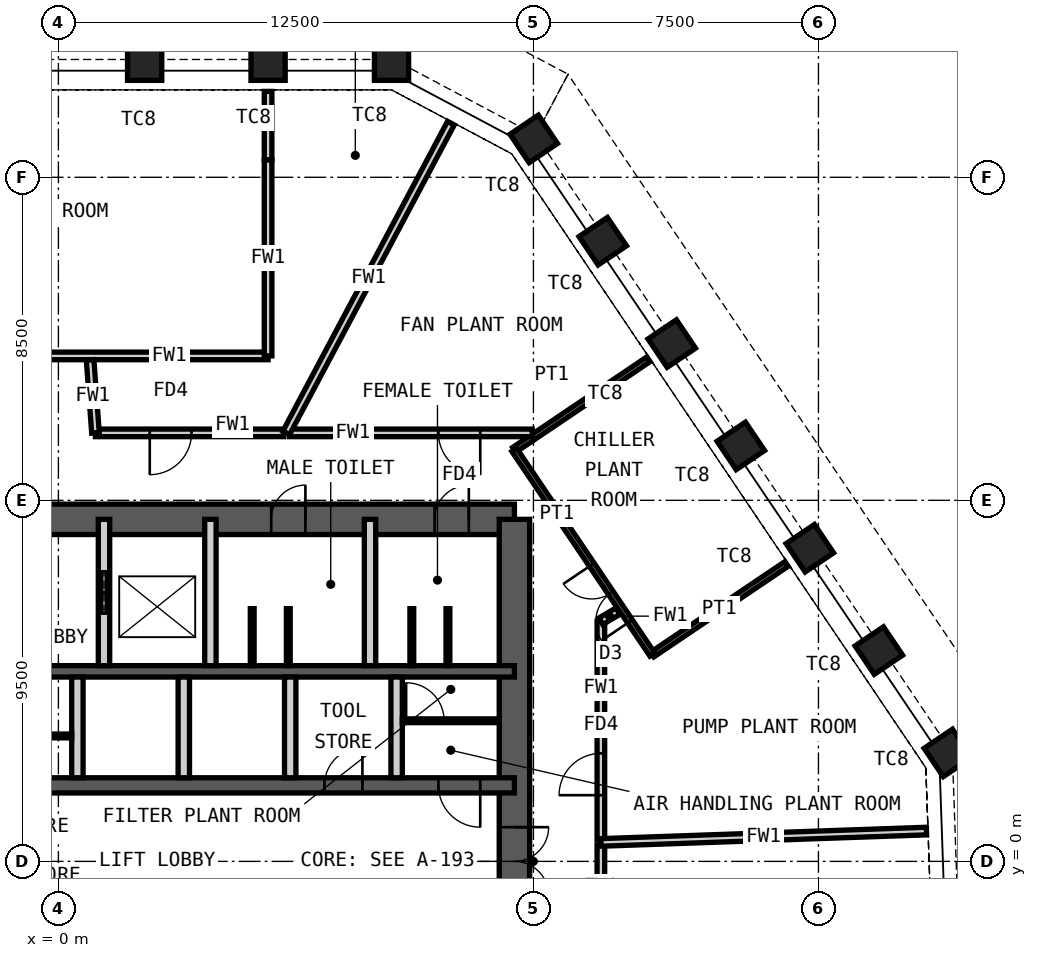
"""IFC4 building model, lengths in metres.
Left out: names, types, materials, properties, quantities, classifications, styles, units other than length and angle.
Written with IfcOpenShell. Run it as: python <this file> out.ifc"""

import sys

from ifc_helpers import new_model, si_unit, direction, frame, frame_2d, origin, origin_2d, place, context, subcontext, project, spatial, rectangle, hollow_rectangle, extrude, element, fill, save


model = new_model("IFC4")
c1 = context("Model", 3, precision=1e-05, world=origin(), true_north=direction((0.0, 1.0)))
c2 = subcontext(c1, "Body", "Model", "MODEL_VIEW")
j1 = project(units=[si_unit("LENGTHUNIT", "METRE"), si_unit("PLANEANGLEUNIT", "RADIAN")], contexts=[c1])
p1 = place(None, origin())
s1 = spatial("IfcSite", under=j1, at=p1, CompositionType="ELEMENT")
p2 = place(p1, origin())
s2 = spatial("IfcBuilding", under=s1, at=p2, CompositionType="ELEMENT")
p3 = place(p2, frame((0.0, 0.0, 337.6)))
s3 = spatial("IfcBuildingStorey", under=s2, at=p3, CompositionType="ELEMENT", Elevation=337.6)
for number, where, z_axis, x_axis in (
    (1, (2.27, 21.0, 0.0), (0.0, 0.0, 1.0), (-1.0, 0.0, 0.0)),
    (2, (5.518, 21.0, 0.0), (0.0, 0.0, 1.0), (-1.0, 0.0, 0.0)),
    (3, (8.766, 21.0, 0.0), (0.0, 0.0, 1.0), (-1.0, 0.0, 0.0)),
    (4, (12.508, 19.01, 0.0), (0.0, 0.0, 1.0), (-0.559, 0.829, 0.0)),
    (5, (14.324, 16.318, 0.0), (0.0, 0.0, 1.0), (-0.559, 0.829, 0.0)),
    (6, (16.141, 13.625, 0.0), (0.0, 0.0, 1.0), (-0.559, 0.829, 0.0)),
    (7, (17.957, 10.932, 0.0), (0.0, 0.0, 1.0), (-0.559, 0.829, 0.0)),
    (8, (19.773, 8.239, 0.0), (0.0, 0.0, 1.0), (-0.559, 0.829, 0.0)),
    (9, (21.589, 5.547, 0.0), (0.0, 0.0, 1.0), (-0.559, 0.829, 0.0)),
    (10, (23.406, 2.854, 0.0), (0.0, 0.0, 1.0), (-0.559, 0.829, 0.0)),
):
    element("IfcColumn", number, at=place(p3, frame(where, z_axis=z_axis, x_axis=x_axis)), inside=s3, PredefinedType="COLUMN", context=c2, shape_type="SweptSolid", body=[
        extrude(hollow_rectangle(XDim=0.9, YDim=0.9, WallThickness=0.05, at=origin_2d()), origin(), (0.0, 0.0, 1.0), 6.0),
    ])
p4 = place(p3, frame((-12.0, 9.0, 0.0), z_axis=(0.0, 0.0, 1.0), x_axis=(1.0, 0.0, 0.0)))
e11 = element("IfcWall", 11, at=p4, inside=s3, PredefinedType="SHEAR", context=c2, shape_type="SweptSolid", body=[
    extrude(rectangle(XDim=24.0, YDim=0.8, at=frame_2d((12.0, 0.0))), origin(), (0.0, 0.0, 1.0), 6.0),
])
p5 = place(p4, frame((10.4, 0.0, 0.0)))
e12 = element("IfcOpeningElement", 12, at=p5, cuts=e11, PredefinedType="OPENING", context=c2, shape_type="SweptSolid", body=[
    extrude(rectangle(XDim=1.0, YDim=2.1, at=frame_2d((0.5, 1.05))), frame((0.0, 0.41, 0.0), z_axis=(0.0, -1.0, 0.0), x_axis=(1.0, 0.0, 0.0)), (0.0, 0.0, 1.0), 0.82),
])
p6 = place(p4, frame((17.6, 0.0, 0.0)))
e13 = element("IfcOpeningElement", 13, at=p6, cuts=e11, PredefinedType="OPENING", context=c2, shape_type="SweptSolid", body=[
    extrude(rectangle(XDim=0.9, YDim=2.1, at=frame_2d((0.45, 1.05))), frame((0.0, 0.41, 0.0), z_axis=(0.0, -1.0, 0.0), x_axis=(1.0, 0.0, 0.0)), (0.0, 0.0, 1.0), 0.82),
])
p7 = place(p4, frame((21.9, 0.0, 0.0)))
e14 = element("IfcOpeningElement", 14, at=p7, cuts=e11, PredefinedType="OPENING", context=c2, shape_type="SweptSolid", body=[
    extrude(rectangle(XDim=0.9, YDim=2.1, at=frame_2d((0.45, 1.05))), frame((0.0, 0.41, 0.0), z_axis=(0.0, -1.0, 0.0), x_axis=(1.0, 0.0, 0.0)), (0.0, 0.0, 1.0), 0.82),
])
p8 = place(p3, frame((12.0, -9.0, 0.0), z_axis=(0.0, 0.0, 1.0), x_axis=(0.0, 1.0, 0.0)))
e15 = element("IfcWall", 15, at=p8, inside=s3, PredefinedType="SHEAR", context=c2, shape_type="SweptSolid", body=[
    extrude(rectangle(XDim=18.0, YDim=0.8, at=frame_2d((9.0, 0.0))), origin(), (0.0, 0.0, 1.0), 6.0),
])
p9 = place(p8, frame((8.1, 0.0, 0.0)))
e16 = element("IfcOpeningElement", 16, at=p9, cuts=e15, PredefinedType="OPENING", context=c2, shape_type="SweptSolid", body=[
    extrude(rectangle(XDim=1.8, YDim=2.1, at=frame_2d((0.9, 1.05))), frame((0.0, 0.41, 0.0), z_axis=(0.0, -1.0, 0.0), x_axis=(1.0, 0.0, 0.0)), (0.0, 0.0, 1.0), 0.82),
])
p10 = place(p3, frame((-12.0, 5.0, 0.0), z_axis=(0.0, 0.0, 1.0), x_axis=(1.0, 0.0, 0.0)))
e17 = element("IfcWall", 17, at=p10, inside=s3, PredefinedType="SHEAR", context=c2, shape_type="SweptSolid", body=[
    extrude(rectangle(XDim=24.0, YDim=0.3, at=frame_2d((12.0, 0.0))), origin(), (0.0, 0.0, 1.0), 6.0),
])
p11 = place(p3, frame((-12.0, 2.0, 0.0), z_axis=(0.0, 0.0, 1.0), x_axis=(1.0, 0.0, 0.0)))
e18 = element("IfcWall", 18, at=p11, inside=s3, PredefinedType="SHEAR", context=c2, shape_type="SweptSolid", body=[
    extrude(rectangle(XDim=24.0, YDim=0.4, at=frame_2d((12.0, 0.0))), origin(), (0.0, 0.0, 1.0), 6.0),
])
p12 = place(p11, frame((2.4, 0.0, 0.0)))
e19 = element("IfcOpeningElement", 19, at=p12, cuts=e18, PredefinedType="OPENING", context=c2, shape_type="SweptSolid", body=[
    extrude(rectangle(XDim=1.1, YDim=2.1, at=frame_2d((0.55, 1.05))), frame((0.0, 0.21, 0.0), z_axis=(0.0, -1.0, 0.0), x_axis=(1.0, 0.0, 0.0)), (0.0, 0.0, 1.0), 0.42),
])
p13 = place(p11, frame((22.0, 0.0, 0.0)))
e20 = element("IfcOpeningElement", 20, at=p13, cuts=e18, PredefinedType="OPENING", context=c2, shape_type="SweptSolid", body=[
    extrude(rectangle(XDim=1.1, YDim=2.1, at=frame_2d((0.55, 1.05))), frame((0.0, 0.21, 0.0), z_axis=(0.0, -1.0, 0.0), x_axis=(1.0, 0.0, 0.0)), (0.0, 0.0, 1.0), 0.42),
])
p14 = place(p11, frame((10.15, 0.0, 0.0)))
e21 = element("IfcOpeningElement", 21, at=p14, cuts=e18, PredefinedType="OPENING", context=c2, shape_type="SweptSolid", body=[
    extrude(rectangle(XDim=1.0, YDim=2.1, at=frame_2d((0.5, 1.05))), frame((0.0, 0.21, 0.0), z_axis=(0.0, -1.0, 0.0), x_axis=(1.0, 0.0, 0.0)), (0.0, 0.0, 1.0), 0.42),
])
p15 = place(p11, frame((6.9, 0.0, 0.0)))
e22 = element("IfcOpeningElement", 22, at=p15, cuts=e18, PredefinedType="OPENING", context=c2, shape_type="SweptSolid", body=[
    extrude(rectangle(XDim=1.0, YDim=2.1, at=frame_2d((0.5, 1.05))), frame((0.0, 0.21, 0.0), z_axis=(0.0, -1.0, 0.0), x_axis=(1.0, 0.0, 0.0)), (0.0, 0.0, 1.0), 0.42),
])
p16 = place(p11, frame((19.0, 0.0, 0.0)))
e23 = element("IfcOpeningElement", 23, at=p16, cuts=e18, PredefinedType="OPENING", context=c2, shape_type="SweptSolid", body=[
    extrude(rectangle(XDim=1.0, YDim=2.1, at=frame_2d((0.5, 1.05))), frame((0.0, 0.21, 0.0), z_axis=(0.0, -1.0, 0.0), x_axis=(1.0, 0.0, 0.0)), (0.0, 0.0, 1.0), 0.42),
])
p17 = place(p3, frame((1.2, 5.15, 0.0), z_axis=(0.0, 0.0, 1.0), x_axis=(0.0, 1.0, 0.0)))
e24 = element("IfcWall", 24, at=p17, inside=s3, PredefinedType="PARTITIONING", context=c2, shape_type="SweptSolid", body=[
    extrude(rectangle(XDim=3.85, YDim=0.3, at=frame_2d((1.925, 0.0))), origin(), (0.0, 0.0, 1.0), 5.78),
])
p18 = place(p17, frame((1.375, 0.0, 0.0)))
e25 = element("IfcOpeningElement", 25, at=p18, cuts=e24, PredefinedType="OPENING", context=c2, shape_type="SweptSolid", body=[
    extrude(rectangle(XDim=1.1, YDim=2.4, at=frame_2d((0.55, 1.2))), frame((0.0, 0.16, 0.0), z_axis=(0.0, -1.0, 0.0), x_axis=(1.0, 0.0, 0.0)), (0.0, 0.0, 1.0), 0.32),
])
for number, where, z_axis, x_axis in (
    (26, (4.0, 5.15, 0.0), (0.0, 0.0, 1.0), (0.0, 1.0, 0.0)),
    (27, (8.2, 5.15, 0.0), (0.0, 0.0, 1.0), (0.0, 1.0, 0.0)),
):
    element("IfcWall", number, at=place(p3, frame(where, z_axis=z_axis, x_axis=x_axis)), inside=s3, PredefinedType="PARTITIONING", context=c2, shape_type="SweptSolid", body=[
        extrude(rectangle(XDim=3.85, YDim=0.3, at=frame_2d((1.925, 0.0))), origin(), (0.0, 0.0, 1.0), 5.78),
    ])
for number, where, z_axis, x_axis in (
    (28, (0.5, 2.2, 0.0), (0.0, 0.0, 1.0), (0.0, 1.0, 0.0)),
    (29, (3.3, 2.2, 0.0), (0.0, 0.0, 1.0), (0.0, 1.0, 0.0)),
    (30, (6.1, 2.2, 0.0), (0.0, 0.0, 1.0), (0.0, 1.0, 0.0)),
    (31, (8.9, 2.2, 0.0), (0.0, 0.0, 1.0), (0.0, 1.0, 0.0)),
):
    element("IfcWall", number, at=place(p3, frame(where, z_axis=z_axis, x_axis=x_axis)), inside=s3, PredefinedType="PARTITIONING", context=c2, shape_type="SweptSolid", body=[
        extrude(rectangle(XDim=2.65, YDim=0.3, at=frame_2d((1.325, 0.0))), origin(), (0.0, 0.0, 1.0), 5.78),
    ])
p19 = place(p3, frame((-2.85, 3.3, 0.0), z_axis=(0.0, 0.0, 1.0), x_axis=(1.0, 0.0, 0.0)))
e32 = element("IfcWall", 32, at=p19, inside=s3, PredefinedType="PARTITIONING", context=c2, shape_type="SweptSolid", body=[
    extrude(rectangle(XDim=3.2, YDim=0.1, at=frame_2d((1.6, 0.0))), origin(), (0.0, 0.0, 1.0), 5.78),
])
p20 = place(p19, frame((0.1, 0.0, 0.0)))
e33 = element("IfcOpeningElement", 33, at=p20, cuts=e32, PredefinedType="OPENING", context=c2, shape_type="SweptSolid", body=[
    extrude(rectangle(XDim=1.0, YDim=2.4, at=frame_2d((0.5, 1.2))), frame((0.0, 0.06, 0.0), z_axis=(0.0, -1.0, 0.0), x_axis=(1.0, 0.0, 0.0)), (0.0, 0.0, 1.0), 0.12),
])
p21 = place(p3, frame((9.05, 3.7, 0.0), z_axis=(0.0, 0.0, 1.0), x_axis=(1.0, 0.0, 0.0)))
e34 = element("IfcWall", 34, at=p21, inside=s3, PredefinedType="PARTITIONING", context=c2, shape_type="SweptSolid", body=[
    extrude(rectangle(XDim=2.55, YDim=0.1, at=frame_2d((1.275, 0.0))), origin(), (0.0, 0.0, 1.0), 5.78),
])
p22 = place(p21, frame((0.1, 0.0, 0.0)))
e35 = element("IfcOpeningElement", 35, at=p22, cuts=e34, PredefinedType="OPENING", context=c2, shape_type="SweptSolid", body=[
    extrude(rectangle(XDim=1.0, YDim=2.4, at=frame_2d((0.5, 1.2))), frame((0.0, 0.06, 0.0), z_axis=(0.0, -1.0, 0.0), x_axis=(1.0, 0.0, 0.0)), (0.0, 0.0, 1.0), 0.12),
])
for number, where, z_axis, x_axis in (
    (36, (5.1, 5.15, 0.0), (0.0, 0.0, 1.0), (0.0, 1.0, 0.0)),
    (37, (6.05, 5.15, 0.0), (0.0, 0.0, 1.0), (0.0, 1.0, 0.0)),
    (38, (9.3, 5.15, 0.0), (0.0, 0.0, 1.0), (0.0, 1.0, 0.0)),
    (39, (10.25, 5.15, 0.0), (0.0, 0.0, 1.0), (0.0, 1.0, 0.0)),
):
    element("IfcWall", number, at=place(p3, frame(where, z_axis=z_axis, x_axis=x_axis)), inside=s3, PredefinedType="PARTITIONING", context=c2, shape_type="SweptSolid", body=[
        extrude(rectangle(XDim=1.5, YDim=0.1, at=frame_2d((0.75, 0.0))), origin(), (0.0, 0.0, 1.0), 2.1),
    ])
p23 = place(p3, frame((5.518, 20.26, 0.0), z_axis=(0.0, 0.0, 1.0), x_axis=(0.0, -1.0, 0.0)))
e40 = element("IfcWall", 40, at=p23, inside=s3, PredefinedType="PARTITIONING", context=c2, shape_type="SweptSolid", body=[
    extrude(rectangle(XDim=1.805, YDim=0.2, at=frame_2d((0.902, 0.0))), origin(), (0.0, 0.0, 1.0), 4.65),
])
p24 = place(p3, frame((-7.474, 13.3, 0.0), z_axis=(0.0, 0.0, 1.0), x_axis=(1.0, 0.0, 0.0)))
e41 = element("IfcWall", 41, at=p24, inside=s3, PredefinedType="PARTITIONING", context=c2, shape_type="SweptSolid", body=[
    extrude(rectangle(XDim=12.992, YDim=0.2, at=frame_2d((6.496, 0.0))), origin(), (0.0, 0.0, 1.0), 5.75),
])
p25 = place(p24, frame((4.197, 0.0, 0.0)))
e42 = element("IfcOpeningElement", 42, at=p25, cuts=e41, PredefinedType="OPENING", context=c2, shape_type="SweptSolid", body=[
    extrude(rectangle(XDim=2.0, YDim=2.4, at=frame_2d((1.0, 1.2))), frame((0.0, 0.11, 0.0), z_axis=(0.0, -1.0, 0.0), x_axis=(1.0, 0.0, 0.0)), (0.0, 0.0, 1.0), 0.22),
])
for number, where, z_axis, x_axis in (
    (43, (15.527, 13.211, 0.0), (0.0, 0.0, 1.0), (-0.829, -0.559, 0.0)),
    (44, (19.16, 7.826, 0.0), (0.0, 0.0, 1.0), (-0.829, -0.559, 0.0)),
):
    element("IfcWall", number, at=place(p3, frame(where, z_axis=z_axis, x_axis=x_axis)), inside=s3, PredefinedType="PARTITIONING", context=c2, shape_type="SweptSolid", body=[
        extrude(rectangle(XDim=4.26, YDim=0.15, at=frame_2d((2.13, 0.0))), origin(), (0.0, 0.0, 1.0), 4.65),
    ])
p26 = place(p3, frame((11.995, 10.829, 0.0), z_axis=(0.0, 0.0, 1.0), x_axis=(0.559193332958, -0.829037282862, 0.0)))
e45 = element("IfcWall", 45, at=p26, inside=s3, PredefinedType="PARTITIONING", context=c2, shape_type="SweptSolid", body=[
    extrude(rectangle(XDim=6.496, YDim=0.15, at=frame_2d((3.248, 0.0))), origin(), (0.0, 0.0, 1.0), 5.75),
])
p27 = place(p26, frame((3.647, 0.0, 0.0)))
e46 = element("IfcOpeningElement", 46, at=p27, cuts=e45, PredefinedType="OPENING", context=c2, shape_type="SweptSolid", body=[
    extrude(rectangle(XDim=1.8, YDim=2.4, at=frame_2d((0.9, 1.2))), frame((0.0, 0.085, 0.0), z_axis=(0.0, -1.0, 0.0), x_axis=(1.0, 0.0, 0.0)), (0.0, 0.0, 1.0), 0.17),
])
p28 = place(p3, frame((14.275, 0.432, 0.0), z_axis=(0.0, 0.0, 1.0), x_axis=(0.0, -1.0, 0.0)))
e47 = element("IfcWall", 47, at=p28, inside=s3, PredefinedType="PARTITIONING", context=c2, shape_type="SweptSolid", body=[
    extrude(rectangle(XDim=5.532, YDim=0.2, at=frame_2d((2.766, 0.0))), origin(), (0.0, 0.0, 1.0), 5.75),
])
p29 = place(p28, frame((3.876, 0.0, 0.0)))
e48 = element("IfcOpeningElement", 48, at=p29, cuts=e47, PredefinedType="OPENING", context=c2, shape_type="SweptSolid", body=[
    extrude(rectangle(XDim=1.1, YDim=2.1, at=frame_2d((0.55, 1.05))), frame((0.0, 0.11, 0.0), z_axis=(0.0, -1.0, 0.0), x_axis=(1.0, 0.0, 0.0)), (0.0, 0.0, 1.0), 0.22),
])
p30 = place(p3, frame((14.275, 6.32, 0.0), z_axis=(0.0, 0.0, 1.0), x_axis=(0.0, -1.0, 0.0)))
e49 = element("IfcWall", 49, at=p30, inside=s3, PredefinedType="PARTITIONING", context=c2, shape_type="SweptSolid", body=[
    extrude(rectangle(XDim=5.755, YDim=0.2, at=frame_2d((2.877, 0.0))), origin(), (0.0, 0.0, 1.0), 5.75),
])
p31 = place(p30, frame((3.479, 0.0, 0.0)))
e50 = element("IfcOpeningElement", 50, at=p31, cuts=e49, PredefinedType="OPENING", context=c2, shape_type="SweptSolid", body=[
    extrude(rectangle(XDim=1.1, YDim=2.1, at=frame_2d((0.55, 1.05))), frame((0.0, 0.11, 0.0), z_axis=(0.0, -1.0, 0.0), x_axis=(1.0, 0.0, 0.0)), (0.0, 0.0, 1.0), 0.22),
])
p32 = place(p3, frame((14.725, 6.585, 0.0), z_axis=(0.0, 0.0, 1.0), x_axis=(-0.86166982492, -0.507469322051, 0.0)))
e51 = element("IfcWall", 51, at=p32, inside=s3, PredefinedType="PARTITIONING", context=c2, shape_type="SweptSolid", body=[
    extrude(rectangle(XDim=0.522, YDim=0.2, at=frame_2d((0.261, 0.0))), origin(), (0.0, 0.0, 1.0), 4.65),
])
p33 = place(p3, frame((6.074, 11.275, 0.0), z_axis=(0.0, 0.0, 1.0), x_axis=(1.0, 0.0, 0.0)))
e52 = element("IfcWall", 52, at=p33, inside=s3, PredefinedType="PARTITIONING", context=c2, shape_type="SweptSolid", body=[
    extrude(rectangle(XDim=6.395, YDim=0.2, at=frame_2d((3.198, 0.0))), origin(), (0.0, 0.0, 1.0), 5.75),
])
p34 = place(p33, frame((3.927, 0.0, 0.0)))
e53 = element("IfcOpeningElement", 53, at=p34, cuts=e52, PredefinedType="OPENING", context=c2, shape_type="SweptSolid", body=[
    extrude(rectangle(XDim=1.1, YDim=2.1, at=frame_2d((0.55, 1.05))), frame((0.0, 0.11, 0.0), z_axis=(0.0, -1.0, 0.0), x_axis=(1.0, 0.0, 0.0)), (0.0, 0.0, 1.0), 0.22),
])
p35 = place(p3, frame((0.976, 11.275, 0.0), z_axis=(0.0, 0.0, 1.0), x_axis=(1.0, 0.0, 0.0)))
e54 = element("IfcWall", 54, at=p35, inside=s3, PredefinedType="PARTITIONING", context=c2, shape_type="SweptSolid", body=[
    extrude(rectangle(XDim=4.946, YDim=0.2, at=frame_2d((2.473, 0.0))), origin(), (0.0, 0.0, 1.0), 5.75),
])
p36 = place(p35, frame((1.428, 0.0, 0.0)))
e55 = element("IfcOpeningElement", 55, at=p36, cuts=e54, PredefinedType="OPENING", context=c2, shape_type="SweptSolid", body=[
    extrude(rectangle(XDim=1.1, YDim=2.1, at=frame_2d((0.55, 1.05))), frame((0.0, 0.11, 0.0), z_axis=(0.0, -1.0, 0.0), x_axis=(1.0, 0.0, 0.0)), (0.0, 0.0, 1.0), 0.22),
])
p37 = place(p3, frame((0.834, 13.195, 0.0), z_axis=(0.0, 0.0, 1.0), x_axis=(0.073292493621, -0.997310488453, 0.0)))
e56 = element("IfcWall", 56, at=p37, inside=s3, PredefinedType="PARTITIONING", context=c2, shape_type="SweptSolid", body=[
    extrude(rectangle(XDim=1.925, YDim=0.2, at=frame_2d((0.963, 0.0))), origin(), (0.0, 0.0, 1.0), 4.65),
])
p38 = place(p3, frame((5.995, 11.275, 0.0), z_axis=(0.0, 0.0, 1.0), x_axis=(0.469452402124, 0.882957780497, 0.0)))
e57 = element("IfcWall", 57, at=p38, inside=s3, PredefinedType="PARTITIONING", context=c2, shape_type="SweptSolid", body=[
    extrude(rectangle(XDim=9.229, YDim=0.2, at=frame_2d((4.615, 0.0))), origin(), (0.0, 0.0, 1.0), 5.75),
])
p39 = place(p3, frame((14.275, 0.499, 0.0), z_axis=(0.0, 0.0, 1.0), x_axis=(0.999391402264, 0.034883019939, 0.0)))
e58 = element("IfcWall", 58, at=p39, inside=s3, PredefinedType="PARTITIONING", context=c2, shape_type="SweptSolid", body=[
    extrude(rectangle(XDim=8.573, YDim=0.2, at=frame_2d((4.287, 0.0))), origin(), (0.0, 0.0, 1.0), 5.75),
])
p40 = place(p3, frame((5.518, 18.455, 0.0), z_axis=(0.0, 0.0, 1.0), x_axis=(0.0, -1.0, 0.0)))
e59 = element("IfcWall", 59, at=p40, inside=s3, PredefinedType="PARTITIONING", context=c2, shape_type="SweptSolid", body=[
    extrude(rectangle(XDim=5.155, YDim=0.2, at=frame_2d((2.578, 0.0))), origin(), (0.0, 0.0, 1.0), 5.75),
])
p41 = place(p6, origin())
e60 = element("IfcDoor", 60, at=p41, inside=s3, OperationType="SINGLE_SWING_LEFT", PredefinedType="DOOR", context=c2, shape_type="SweptSolid", body=[
    extrude(rectangle(XDim=0.9, YDim=2.1, at=frame_2d((0.45, 1.05))), frame((0.0, 0.025, 0.0), z_axis=(0.0, -1.0, 0.0), x_axis=(1.0, 0.0, 0.0)), (0.0, 0.0, 1.0), 0.05),
])
fill(e13, e60)
p42 = place(p7, origin())
e61 = element("IfcDoor", 61, at=p42, inside=s3, OperationType="SINGLE_SWING_LEFT", PredefinedType="DOOR", context=c2, shape_type="SweptSolid", body=[
    extrude(rectangle(XDim=0.9, YDim=2.1, at=frame_2d((0.45, 1.05))), frame((0.0, 0.025, 0.0), z_axis=(0.0, -1.0, 0.0), x_axis=(1.0, 0.0, 0.0)), (0.0, 0.0, 1.0), 0.05),
])
fill(e14, e61)
p43 = place(p13, origin())
e62 = element("IfcDoor", 62, at=p43, inside=s3, OperationType="SINGLE_SWING_RIGHT", PredefinedType="DOOR", context=c2, shape_type="SweptSolid", body=[
    extrude(rectangle(XDim=1.1, YDim=2.1, at=frame_2d((0.55, 1.05))), frame((0.0, 0.025, 0.0), z_axis=(0.0, -1.0, 0.0), x_axis=(1.0, 0.0, 0.0)), (0.0, 0.0, 1.0), 0.05),
])
fill(e20, e62)
p44 = place(p9, origin())
e63 = element("IfcDoor", 63, at=p44, inside=s3, OperationType="DOUBLE_DOOR_DOUBLE_SWING", PredefinedType="DOOR", context=c2, shape_type="SweptSolid", body=[
    extrude(rectangle(XDim=1.8, YDim=2.1, at=frame_2d((0.9, 1.05))), frame((0.0, 0.025, 0.0), z_axis=(0.0, -1.0, 0.0), x_axis=(1.0, 0.0, 0.0)), (0.0, 0.0, 1.0), 0.05),
])
fill(e16, e63)
p45 = place(p18, origin())
e64 = element("IfcDoor", 64, at=p45, inside=s3, OperationType="DOUBLE_DOOR_SLIDING", PredefinedType="DOOR", context=c2, shape_type="SweptSolid", body=[
    extrude(rectangle(XDim=1.1, YDim=2.4, at=frame_2d((0.55, 1.2))), frame((0.0, 0.025, 0.0), z_axis=(0.0, -1.0, 0.0), x_axis=(1.0, 0.0, 0.0)), (0.0, 0.0, 1.0), 0.05),
])
fill(e25, e64)
p46 = place(p16, origin())
e65 = element("IfcDoor", 65, at=p46, inside=s3, OperationType="SINGLE_SWING_LEFT", PredefinedType="DOOR", context=c2, shape_type="SweptSolid", body=[
    extrude(rectangle(XDim=1.0, YDim=2.1, at=frame_2d((0.5, 1.05))), frame((0.0, 0.025, 0.0), z_axis=(0.0, -1.0, 0.0), x_axis=(1.0, 0.0, 0.0)), (0.0, 0.0, 1.0), 0.05),
])
fill(e23, e65)
p47 = place(p22, origin())
e66 = element("IfcDoor", 66, at=p47, inside=s3, OperationType="SINGLE_SWING_RIGHT", PredefinedType="DOOR", context=c2, shape_type="SweptSolid", body=[
    extrude(rectangle(XDim=1.0, YDim=2.4, at=frame_2d((0.5, 1.2))), frame((0.0, 0.025, 0.0), z_axis=(0.0, -1.0, 0.0), x_axis=(1.0, 0.0, 0.0)), (0.0, 0.0, 1.0), 0.05),
])
fill(e35, e66)
p48 = place(p27, origin())
e67 = element("IfcDoor", 67, at=p48, inside=s3, OperationType="DOUBLE_DOOR_DOUBLE_SWING", PredefinedType="DOOR", context=c2, shape_type="SweptSolid", body=[
    extrude(rectangle(XDim=1.8, YDim=2.4, at=frame_2d((0.9, 1.2))), frame((0.0, 0.025, 0.0), z_axis=(0.0, -1.0, 0.0), x_axis=(1.0, 0.0, 0.0)), (0.0, 0.0, 1.0), 0.05),
])
fill(e46, e67)
p49 = place(p31, origin())
e68 = element("IfcDoor", 68, at=p49, inside=s3, OperationType="SINGLE_SWING_RIGHT", PredefinedType="DOOR", context=c2, shape_type="SweptSolid", body=[
    extrude(rectangle(XDim=1.1, YDim=2.1, at=frame_2d((0.55, 1.05))), frame((0.0, 0.025, 0.0), z_axis=(0.0, -1.0, 0.0), x_axis=(1.0, 0.0, 0.0)), (0.0, 0.0, 1.0), 0.05),
])
fill(e50, e68)
p50 = place(p34, origin())
e69 = element("IfcDoor", 69, at=p50, inside=s3, OperationType="SINGLE_SWING_RIGHT", PredefinedType="DOOR", context=c2, shape_type="SweptSolid", body=[
    extrude(rectangle(XDim=1.1, YDim=2.1, at=frame_2d((0.55, 1.05))), frame((0.0, 0.025, 0.0), z_axis=(0.0, -1.0, 0.0), x_axis=(1.0, 0.0, 0.0)), (0.0, 0.0, 1.0), 0.05),
])
fill(e53, e69)
p51 = place(p36, origin())
e70 = element("IfcDoor", 70, at=p51, inside=s3, OperationType="SINGLE_SWING_LEFT", PredefinedType="DOOR", context=c2, shape_type="SweptSolid", body=[
    extrude(rectangle(XDim=1.1, YDim=2.1, at=frame_2d((0.55, 1.05))), frame((0.0, 0.025, 0.0), z_axis=(0.0, -1.0, 0.0), x_axis=(1.0, 0.0, 0.0)), (0.0, 0.0, 1.0), 0.05),
])
fill(e55, e70)
save(model, sys.argv[1])
